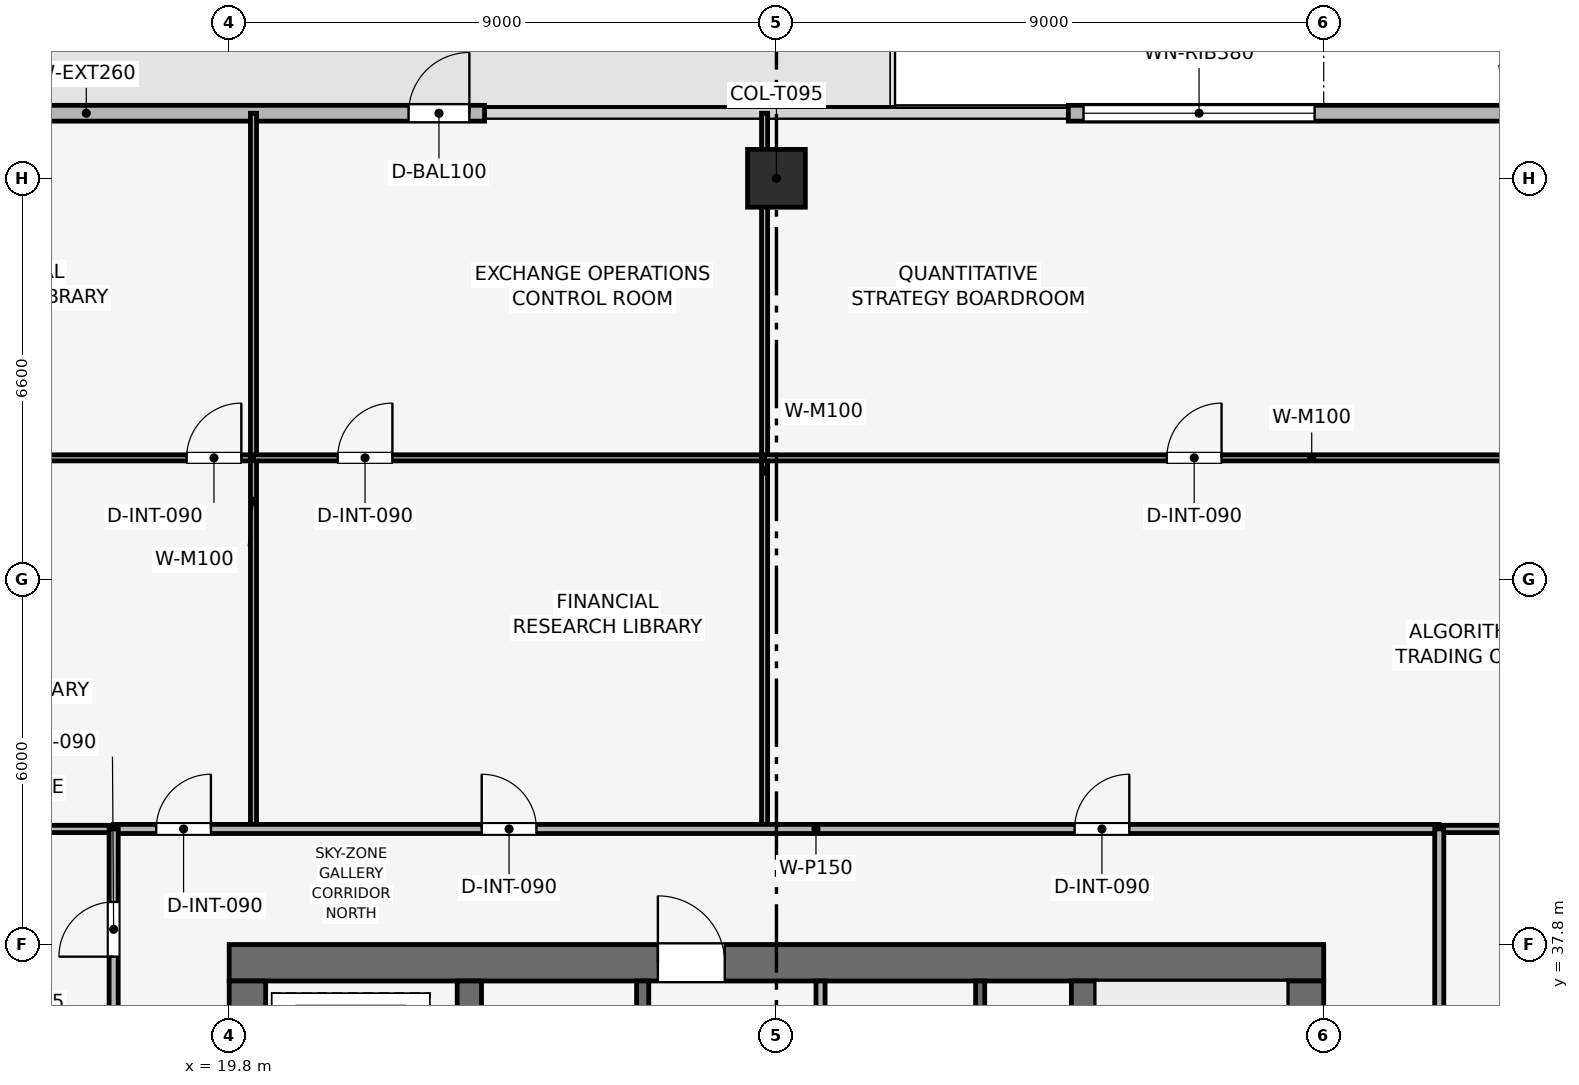
"""IFC4 building model, lengths in metres.
Left out: names, types, materials, properties, quantities, classifications, styles, units other than length and angle.
Written with IfcOpenShell. Run it as: python <this file> out.ifc"""

import sys

from ifc_helpers import new_model, si_unit, direction, frame, frame_2d, origin, origin_2d, place, context, subcontext, project, spatial, rectangle, extrude, element, fill, save


model = new_model("IFC4")
c1 = context("Model", 3, precision=1e-05, world=origin(), true_north=direction((0.0, 1.0)))
c2 = subcontext(c1, "Body", "Model", "MODEL_VIEW")
j1 = project(units=[si_unit("LENGTHUNIT", "METRE"), si_unit("PLANEANGLEUNIT", "RADIAN")], contexts=[c1])
p1 = place(None, origin())
s1 = spatial("IfcSite", under=j1, at=p1, CompositionType="ELEMENT")
p2 = place(p1, origin())
s2 = spatial("IfcBuilding", under=s1, at=p2, CompositionType="ELEMENT")
p3 = place(p2, frame((0.0, 0.0, 299.25)))
s3 = spatial("IfcBuildingStorey", under=s2, at=p3, CompositionType="ELEMENT", Elevation=299.25)
p4 = place(p3, frame((19.8, 37.5, 0.0), z_axis=(0.0, 0.0, 1.0), x_axis=(1.0, 0.0, 0.0)))
e1 = element("IfcWall", 1, at=p4, inside=s3, PredefinedType="SHEAR", context=c2, shape_type="SweptSolid", body=[
    extrude(rectangle(XDim=18.0, YDim=0.6, at=frame_2d((9.0, 0.0))), origin(), (0.0, 0.0, 1.0), 3.75),
])
p5 = place(p4, frame((7.05, 0.0, 0.0)))
e2 = element("IfcOpeningElement", 2, at=p5, cuts=e1, PredefinedType="OPENING", context=c2, shape_type="SweptSolid", body=[
    extrude(rectangle(XDim=1.1, YDim=2.15, at=frame_2d((0.55, 1.075))), frame((0.0, 0.31, 0.0), z_axis=(0.0, -1.0, 0.0), x_axis=(1.0, 0.0, 0.0)), (0.0, 0.0, 1.0), 0.62),
])
p6 = place(p3, frame((20.1, 20.4, 0.0), z_axis=(0.0, 0.0, 1.0), x_axis=(0.0, 1.0, 0.0)))
e3 = element("IfcWall", 3, at=p6, inside=s3, PredefinedType="SHEAR", context=c2, shape_type="SweptSolid", body=[
    extrude(rectangle(XDim=16.8, YDim=0.6, at=frame_2d((8.4, 0.0))), origin(), (0.0, 0.0, 1.0), 3.75),
])
p7 = place(p6, frame((10.4, 0.0, 0.0)))
e4 = element("IfcOpeningElement", 4, at=p7, cuts=e3, PredefinedType="OPENING", context=c2, shape_type="SweptSolid", body=[
    extrude(rectangle(XDim=1.1, YDim=2.15, at=frame_2d((0.55, 1.075))), frame((0.0, 0.31, 0.0), z_axis=(0.0, -1.0, 0.0), x_axis=(1.0, 0.0, 0.0)), (0.0, 0.0, 1.0), 0.62),
])
p8 = place(p3, frame((37.5, 20.4, 0.0), z_axis=(0.0, 0.0, 1.0), x_axis=(0.0, 1.0, 0.0)))
e5 = element("IfcWall", 5, at=p8, inside=s3, PredefinedType="SHEAR", context=c2, shape_type="SweptSolid", body=[
    extrude(rectangle(XDim=16.8, YDim=0.6, at=frame_2d((8.4, 0.0))), origin(), (0.0, 0.0, 1.0), 3.75),
])
p9 = place(p8, frame((4.9, 0.0, 0.0)))
e6 = element("IfcOpeningElement", 6, at=p9, cuts=e5, PredefinedType="OPENING", context=c2, shape_type="SweptSolid", body=[
    extrude(rectangle(XDim=1.1, YDim=2.15, at=frame_2d((0.55, 1.075))), frame((0.0, 0.31, 0.0), z_axis=(0.0, -1.0, 0.0), x_axis=(1.0, 0.0, 0.0)), (0.0, 0.0, 1.0), 0.62),
])
for number, where, z_axis, x_axis in (
    (7, (23.75, 20.4, 0.0), (0.0, 0.0, 1.0), (0.0, 1.0, 0.0)),
    (8, (33.85, 20.4, 0.0), (0.0, 0.0, 1.0), (0.0, 1.0, 0.0)),
):
    element("IfcWall", number, at=place(p3, frame(where, z_axis=z_axis, x_axis=x_axis)), inside=s3, PredefinedType="SHEAR", context=c2, shape_type="SweptSolid", body=[
        extrude(rectangle(XDim=16.8, YDim=0.4, at=frame_2d((8.4, 0.0))), origin(), (0.0, 0.0, 1.0), 3.75),
    ])
p10 = place(p3, frame((28.8, 50.4, 0.003), z_axis=(0.0, 0.0, 1.0), x_axis=(1.0, 0.0, 0.0)))
e9 = element("IfcColumn", 9, at=p10, inside=s3, PredefinedType="COLUMN", context=c2, shape_type="SweptSolid", body=[
    extrude(rectangle(XDim=0.95, YDim=0.95, at=origin_2d()), origin(), (0.0, 0.0, 1.0), 3.504),
])
p11 = place(p3, frame((12.3, 51.47, 0.0), z_axis=(0.0, 0.0, 1.0), x_axis=(1.0, 0.0, 0.0)))
e10 = element("IfcWall", 10, at=p11, inside=s3, PredefinedType="SOLIDWALL", context=c2, shape_type="SweptSolid", body=[
    extrude(rectangle(XDim=11.7, YDim=0.26, at=frame_2d((5.85, 0.0))), origin(), (0.0, 0.0, 1.0), 3.51),
])
p12 = place(p11, frame((10.45, 0.0, 0.0)))
e11 = element("IfcOpeningElement", 11, at=p12, cuts=e10, PredefinedType="OPENING", context=c2, shape_type="SweptSolid", body=[
    extrude(rectangle(XDim=1.0, YDim=2.2, at=frame_2d((0.5, 1.1))), frame((0.0, 0.14, 0.0), z_axis=(0.0, -1.0, 0.0), x_axis=(1.0, 0.0, 0.0)), (0.0, 0.0, 1.0), 0.28),
])
p13 = place(p3, frame((33.6, 51.47, 0.0), z_axis=(0.0, 0.0, 1.0), x_axis=(1.0, 0.0, 0.0)))
e12 = element("IfcWall", 12, at=p13, inside=s3, PredefinedType="SOLIDWALL", context=c2, shape_type="SweptSolid", body=[
    extrude(rectangle(XDim=11.7, YDim=0.26, at=frame_2d((5.85, 0.0))), origin(), (0.0, 0.0, 1.0), 3.51),
])
p14 = place(p13, frame((0.25, 0.0, 0.9)))
e13 = element("IfcOpeningElement", 13, at=p14, cuts=e12, PredefinedType="OPENING", context=c2, shape_type="SweptSolid", body=[
    extrude(rectangle(XDim=3.8, YDim=1.9, at=frame_2d((1.9, 0.95))), frame((0.0, 0.14, 0.0), z_axis=(0.0, -1.0, 0.0), x_axis=(1.0, 0.0, 0.0)), (0.0, 0.0, 1.0), 0.28),
])
p15 = place(p3, frame((32.15, 34.0, 0.0), z_axis=(0.0, 0.0, 1.0), x_axis=(0.0, 1.0, 0.0)))
e14 = element("IfcWall", 14, at=p15, inside=s3, PredefinedType="SHEAR", context=c2, shape_type="SweptSolid", body=[
    extrude(rectangle(XDim=3.2, YDim=0.15, at=frame_2d((1.6, 0.0))), origin(), (0.0, 0.0, 1.0), 3.51),
])
p16 = place(p3, frame((26.6, 34.0, 0.0), z_axis=(0.0, 0.0, 1.0), x_axis=(0.0, 1.0, 0.0)))
e15 = element("IfcWall", 15, at=p16, inside=s3, PredefinedType="SHEAR", context=c2, shape_type="SweptSolid", body=[
    extrude(rectangle(XDim=3.2, YDim=0.2, at=frame_2d((1.6, 0.0))), origin(), (0.0, 0.0, 1.0), 3.51),
])
p17 = place(p16, frame((0.75, 0.0, 0.0)))
e16 = element("IfcOpeningElement", 16, at=p17, cuts=e15, PredefinedType="OPENING", context=c2, shape_type="SweptSolid", body=[
    extrude(rectangle(XDim=1.1, YDim=2.15, at=frame_2d((0.55, 1.075))), frame((0.0, 0.11, 0.0), z_axis=(0.0, -1.0, 0.0), x_axis=(1.0, 0.0, 0.0)), (0.0, 0.0, 1.0), 0.22),
])
p18 = place(p3, frame((29.525, 33.925, 0.0), z_axis=(0.0, 0.0, 1.0), x_axis=(0.0, 1.0, 0.0)))
e17 = element("IfcWall", 17, at=p18, inside=s3, PredefinedType="PARTITIONING", context=c2, shape_type="SweptSolid", body=[
    extrude(rectangle(XDim=3.275, YDim=0.15, at=frame_2d((1.637, 0.0))), origin(), (0.0, 0.0, 1.0), 3.51),
])
p19 = place(p18, frame((0.85, 0.0, 0.0)))
e18 = element("IfcOpeningElement", 18, at=p19, cuts=e17, PredefinedType="OPENING", context=c2, shape_type="SweptSolid", body=[
    extrude(rectangle(XDim=0.9, YDim=2.1, at=frame_2d((0.45, 1.05))), frame((0.0, 0.085, 0.0), z_axis=(0.0, -1.0, 0.0), x_axis=(1.0, 0.0, 0.0)), (0.0, 0.0, 1.0), 0.17),
])
p20 = place(p3, frame((12.3, 45.803, 0.0), z_axis=(0.0, 0.0, 1.0), x_axis=(1.0, 0.0, 0.0)))
e19 = element("IfcWall", 19, at=p20, inside=s3, PredefinedType="MOVABLE", context=c2, shape_type="SweptSolid", body=[
    extrude(rectangle(XDim=7.9, YDim=0.1, at=frame_2d((3.95, 0.0))), origin(), (0.0, 0.0, 1.0), 3.095),
])
p21 = place(p20, frame((6.8, 0.0, 0.0)))
e20 = element("IfcOpeningElement", 20, at=p21, cuts=e19, PredefinedType="OPENING", context=c2, shape_type="SweptSolid", body=[
    extrude(rectangle(XDim=0.9, YDim=2.1, at=frame_2d((0.45, 1.05))), frame((0.0, 0.06, 0.0), z_axis=(0.0, -1.0, 0.0), x_axis=(1.0, 0.0, 0.0)), (0.0, 0.0, 1.0), 0.12),
])
p22 = place(p3, frame((20.2, 39.7, 0.0), z_axis=(0.0, 0.0, 1.0), x_axis=(0.0, 1.0, 0.0)))
e21 = element("IfcWall", 21, at=p22, inside=s3, PredefinedType="MOVABLE", context=c2, shape_type="SweptSolid", body=[
    extrude(rectangle(XDim=11.77, YDim=0.1, at=frame_2d((5.885, 0.0))), origin(), (0.0, 0.0, 1.0), 3.095),
])
p23 = place(p3, frame((20.2, 45.803, 0.0), z_axis=(0.0, 0.0, 1.0), x_axis=(1.0, 0.0, 0.0)))
e22 = element("IfcWall", 22, at=p23, inside=s3, PredefinedType="MOVABLE", context=c2, shape_type="SweptSolid", body=[
    extrude(rectangle(XDim=8.405, YDim=0.1, at=frame_2d((4.203, 0.0))), origin(), (0.0, 0.0, 1.0), 3.095),
])
p24 = place(p23, frame((1.384, 0.0, 0.0)))
e23 = element("IfcOpeningElement", 23, at=p24, cuts=e22, PredefinedType="OPENING", context=c2, shape_type="SweptSolid", body=[
    extrude(rectangle(XDim=0.9, YDim=2.1, at=frame_2d((0.45, 1.05))), frame((0.0, 0.06, 0.0), z_axis=(0.0, -1.0, 0.0), x_axis=(1.0, 0.0, 0.0)), (0.0, 0.0, 1.0), 0.12),
])
p25 = place(p3, frame((28.605, 39.7, 0.0), z_axis=(0.0, 0.0, 1.0), x_axis=(0.0, 1.0, 0.0)))
e24 = element("IfcWall", 24, at=p25, inside=s3, PredefinedType="MOVABLE", context=c2, shape_type="SweptSolid", body=[
    extrude(rectangle(XDim=11.77, YDim=0.1, at=frame_2d((5.885, 0.0))), origin(), (0.0, 0.0, 1.0), 2.995),
])
p26 = place(p3, frame((28.605, 45.803, 0.0), z_axis=(0.0, 0.0, 1.0), x_axis=(1.0, 0.0, 0.0)))
e25 = element("IfcWall", 25, at=p26, inside=s3, PredefinedType="MOVABLE", context=c2, shape_type="SweptSolid", body=[
    extrude(rectangle(XDim=16.695, YDim=0.1, at=frame_2d((8.348, 0.0))), origin(), (0.0, 0.0, 1.0), 3.095),
])
p27 = place(p26, frame((6.615, 0.0, 0.0)))
e26 = element("IfcOpeningElement", 26, at=p27, cuts=e25, PredefinedType="OPENING", context=c2, shape_type="SweptSolid", body=[
    extrude(rectangle(XDim=0.9, YDim=2.1, at=frame_2d((0.45, 1.05))), frame((0.0, 0.06, 0.0), z_axis=(0.0, -1.0, 0.0), x_axis=(1.0, 0.0, 0.0)), (0.0, 0.0, 1.0), 0.12),
])
for number, where, z_axis, x_axis in (
    (27, (6.13, 39.7, 0.0), (0.0, 0.0, 1.0), (1.0, 0.0, 0.0)),
    (28, (39.7, 39.7, 0.0), (0.0, 0.0, 1.0), (1.0, 0.0, 0.0)),
):
    element("IfcWall", number, at=place(p3, frame(where, z_axis=z_axis, x_axis=x_axis)), inside=s3, PredefinedType="PARTITIONING", context=c2, shape_type="SweptSolid", body=[
        extrude(rectangle(XDim=11.77, YDim=0.12, at=frame_2d((5.885, 0.0))), origin(), (0.0, 0.0, 1.0), 3.095),
    ])
p28 = place(p3, frame((17.9, 39.7, 0.0), z_axis=(0.0, 0.0, 1.0), x_axis=(1.0, 0.0, 0.0)))
e29 = element("IfcWall", 29, at=p28, inside=s3, PredefinedType="PARTITIONING", context=c2, shape_type="SweptSolid", body=[
    extrude(rectangle(XDim=21.8, YDim=0.15, at=frame_2d((10.9, 0.0))), origin(), (0.0, 0.0, 1.0), 3.095),
])
p29 = place(p28, frame((0.7, 0.0, 0.0)))
e30 = element("IfcOpeningElement", 30, at=p29, cuts=e29, PredefinedType="OPENING", context=c2, shape_type="SweptSolid", body=[
    extrude(rectangle(XDim=0.9, YDim=2.1, at=frame_2d((0.45, 1.05))), frame((0.0, 0.085, 0.0), z_axis=(0.0, -1.0, 0.0), x_axis=(1.0, 0.0, 0.0)), (0.0, 0.0, 1.0), 0.17),
])
p30 = place(p28, frame((6.053, 0.0, 0.0)))
e31 = element("IfcOpeningElement", 31, at=p30, cuts=e29, PredefinedType="OPENING", context=c2, shape_type="SweptSolid", body=[
    extrude(rectangle(XDim=0.9, YDim=2.1, at=frame_2d((0.45, 1.05))), frame((0.0, 0.085, 0.0), z_axis=(0.0, -1.0, 0.0), x_axis=(1.0, 0.0, 0.0)), (0.0, 0.0, 1.0), 0.17),
])
p31 = place(p28, frame((15.803, 0.0, 0.0)))
e32 = element("IfcOpeningElement", 32, at=p31, cuts=e29, PredefinedType="OPENING", context=c2, shape_type="SweptSolid", body=[
    extrude(rectangle(XDim=0.9, YDim=2.1, at=frame_2d((0.45, 1.05))), frame((0.0, 0.085, 0.0), z_axis=(0.0, -1.0, 0.0), x_axis=(1.0, 0.0, 0.0)), (0.0, 0.0, 1.0), 0.17),
])
p32 = place(p3, frame((17.9, 12.3, 0.0), z_axis=(0.0, 0.0, 1.0), x_axis=(0.0, 1.0, 0.0)))
e33 = element("IfcWall", 33, at=p32, inside=s3, PredefinedType="PARTITIONING", context=c2, shape_type="SweptSolid", body=[
    extrude(rectangle(XDim=27.4, YDim=0.15, at=frame_2d((13.7, 0.0))), origin(), (0.0, 0.0, 1.0), 3.095),
])
p33 = place(p32, frame((2.365, 0.0, 0.0)))
e34 = element("IfcOpeningElement", 34, at=p33, cuts=e33, PredefinedType="OPENING", context=c2, shape_type="SweptSolid", body=[
    extrude(rectangle(XDim=0.9, YDim=2.1, at=frame_2d((0.45, 1.05))), frame((0.0, 0.085, 0.0), z_axis=(0.0, -1.0, 0.0), x_axis=(1.0, 0.0, 0.0)), (0.0, 0.0, 1.0), 0.17),
])
p34 = place(p32, frame((10.215, 0.0, 0.0)))
e35 = element("IfcOpeningElement", 35, at=p34, cuts=e33, PredefinedType="OPENING", context=c2, shape_type="SweptSolid", body=[
    extrude(rectangle(XDim=0.9, YDim=2.1, at=frame_2d((0.45, 1.05))), frame((0.0, 0.085, 0.0), z_axis=(0.0, -1.0, 0.0), x_axis=(1.0, 0.0, 0.0)), (0.0, 0.0, 1.0), 0.17),
])
p35 = place(p32, frame((16.65, 0.0, 0.0)))
e36 = element("IfcOpeningElement", 36, at=p35, cuts=e33, PredefinedType="OPENING", context=c2, shape_type="SweptSolid", body=[
    extrude(rectangle(XDim=0.9, YDim=2.1, at=frame_2d((0.45, 1.05))), frame((0.0, 0.085, 0.0), z_axis=(0.0, -1.0, 0.0), x_axis=(1.0, 0.0, 0.0)), (0.0, 0.0, 1.0), 0.17),
])
p36 = place(p32, frame((19.55, 0.0, 0.0)))
e37 = element("IfcOpeningElement", 37, at=p36, cuts=e33, PredefinedType="OPENING", context=c2, shape_type="SweptSolid", body=[
    extrude(rectangle(XDim=0.9, YDim=2.1, at=frame_2d((0.45, 1.05))), frame((0.0, 0.085, 0.0), z_axis=(0.0, -1.0, 0.0), x_axis=(1.0, 0.0, 0.0)), (0.0, 0.0, 1.0), 0.17),
])
p37 = place(p32, frame((22.3, 0.0, 0.0)))
e38 = element("IfcOpeningElement", 38, at=p37, cuts=e33, PredefinedType="OPENING", context=c2, shape_type="SweptSolid", body=[
    extrude(rectangle(XDim=0.95, YDim=2.1, at=frame_2d((0.475, 1.05))), frame((0.0, 0.085, 0.0), z_axis=(0.0, -1.0, 0.0), x_axis=(1.0, 0.0, 0.0)), (0.0, 0.0, 1.0), 0.17),
])
p38 = place(p32, frame((25.3, 0.0, 0.0)))
e39 = element("IfcOpeningElement", 39, at=p38, cuts=e33, PredefinedType="OPENING", context=c2, shape_type="SweptSolid", body=[
    extrude(rectangle(XDim=0.9, YDim=2.1, at=frame_2d((0.45, 1.05))), frame((0.0, 0.085, 0.0), z_axis=(0.0, -1.0, 0.0), x_axis=(1.0, 0.0, 0.0)), (0.0, 0.0, 1.0), 0.17),
])
p39 = place(p3, frame((39.7, 24.4, 0.0), z_axis=(0.0, 0.0, 1.0), x_axis=(0.0, 1.0, 0.0)))
e40 = element("IfcWall", 40, at=p39, inside=s3, PredefinedType="PARTITIONING", context=c2, shape_type="SweptSolid", body=[
    extrude(rectangle(XDim=15.3, YDim=0.15, at=frame_2d((7.65, 0.0))), origin(), (0.0, 0.0, 1.0), 3.095),
])
p40 = place(p39, frame((7.2, 0.0, 0.0)))
e41 = element("IfcOpeningElement", 41, at=p40, cuts=e40, PredefinedType="OPENING", context=c2, shape_type="SweptSolid", body=[
    extrude(rectangle(XDim=0.9, YDim=2.1, at=frame_2d((0.45, 1.05))), frame((0.0, 0.085, 0.0), z_axis=(0.0, -1.0, 0.0), x_axis=(1.0, 0.0, 0.0)), (0.0, 0.0, 1.0), 0.17),
])
p41 = place(p12, origin())
e42 = element("IfcDoor", 42, at=p41, inside=s3, OperationType="SINGLE_SWING_RIGHT", PredefinedType="DOOR", context=c2, shape_type="SweptSolid", body=[
    extrude(rectangle(XDim=1.0, YDim=2.2, at=frame_2d((0.5, 1.1))), frame((0.0, 0.025, 0.0), z_axis=(0.0, -1.0, 0.0), x_axis=(1.0, 0.0, 0.0)), (0.0, 0.0, 1.0), 0.05),
])
fill(e11, e42)
p42 = place(p14, origin())
e43 = element("IfcWindow", 43, at=p42, inside=s3, PartitioningType="SINGLE_PANEL", PredefinedType="WINDOW", context=c2, shape_type="SweptSolid", body=[
    extrude(rectangle(XDim=3.8, YDim=1.9, at=frame_2d((1.9, 0.95))), frame((0.0, 0.03, 0.0), z_axis=(0.0, -1.0, 0.0), x_axis=(1.0, 0.0, 0.0)), (0.0, 0.0, 1.0), 0.06),
])
fill(e13, e43)
p43 = place(p21, origin())
e44 = element("IfcDoor", 44, at=p43, inside=s3, OperationType="SINGLE_SWING_RIGHT", PredefinedType="DOOR", context=c2, shape_type="SweptSolid", body=[
    extrude(rectangle(XDim=0.9, YDim=2.1, at=frame_2d((0.45, 1.05))), frame((0.0, 0.025, 0.0), z_axis=(0.0, -1.0, 0.0), x_axis=(1.0, 0.0, 0.0)), (0.0, 0.0, 1.0), 0.05),
])
fill(e20, e44)
p44 = place(p24, origin())
e45 = element("IfcDoor", 45, at=p44, inside=s3, OperationType="SINGLE_SWING_RIGHT", PredefinedType="DOOR", context=c2, shape_type="SweptSolid", body=[
    extrude(rectangle(XDim=0.9, YDim=2.1, at=frame_2d((0.45, 1.05))), frame((0.0, 0.025, 0.0), z_axis=(0.0, -1.0, 0.0), x_axis=(1.0, 0.0, 0.0)), (0.0, 0.0, 1.0), 0.05),
])
fill(e23, e45)
p45 = place(p27, origin())
e46 = element("IfcDoor", 46, at=p45, inside=s3, OperationType="SINGLE_SWING_RIGHT", PredefinedType="DOOR", context=c2, shape_type="SweptSolid", body=[
    extrude(rectangle(XDim=0.9, YDim=2.1, at=frame_2d((0.45, 1.05))), frame((0.0, 0.025, 0.0), z_axis=(0.0, -1.0, 0.0), x_axis=(1.0, 0.0, 0.0)), (0.0, 0.0, 1.0), 0.05),
])
fill(e26, e46)
p46 = place(p29, origin())
e47 = element("IfcDoor", 47, at=p46, inside=s3, OperationType="SINGLE_SWING_RIGHT", PredefinedType="DOOR", context=c2, shape_type="SweptSolid", body=[
    extrude(rectangle(XDim=0.9, YDim=2.1, at=frame_2d((0.45, 1.05))), frame((0.0, 0.025, 0.0), z_axis=(0.0, -1.0, 0.0), x_axis=(1.0, 0.0, 0.0)), (0.0, 0.0, 1.0), 0.05),
])
fill(e30, e47)
p47 = place(p30, origin())
e48 = element("IfcDoor", 48, at=p47, inside=s3, OperationType="SINGLE_SWING_LEFT", PredefinedType="DOOR", context=c2, shape_type="SweptSolid", body=[
    extrude(rectangle(XDim=0.9, YDim=2.1, at=frame_2d((0.45, 1.05))), frame((0.0, 0.025, 0.0), z_axis=(0.0, -1.0, 0.0), x_axis=(1.0, 0.0, 0.0)), (0.0, 0.0, 1.0), 0.05),
])
fill(e31, e48)
p48 = place(p31, origin())
e49 = element("IfcDoor", 49, at=p48, inside=s3, OperationType="SINGLE_SWING_RIGHT", PredefinedType="DOOR", context=c2, shape_type="SweptSolid", body=[
    extrude(rectangle(XDim=0.9, YDim=2.1, at=frame_2d((0.45, 1.05))), frame((0.0, 0.025, 0.0), z_axis=(0.0, -1.0, 0.0), x_axis=(1.0, 0.0, 0.0)), (0.0, 0.0, 1.0), 0.05),
])
fill(e32, e49)
p49 = place(p38, origin())
e50 = element("IfcDoor", 50, at=p49, inside=s3, OperationType="SINGLE_SWING_LEFT", PredefinedType="DOOR", context=c2, shape_type="SweptSolid", body=[
    extrude(rectangle(XDim=0.9, YDim=2.1, at=frame_2d((0.45, 1.05))), frame((0.0, 0.025, 0.0), z_axis=(0.0, -1.0, 0.0), x_axis=(1.0, 0.0, 0.0)), (0.0, 0.0, 1.0), 0.05),
])
fill(e39, e50)
p50 = place(p5, origin())
e51 = element("IfcDoor", 51, at=p50, inside=s3, OperationType="SINGLE_SWING_LEFT", PredefinedType="DOOR", context=c2, shape_type="SweptSolid", body=[
    extrude(rectangle(XDim=1.1, YDim=2.15, at=frame_2d((0.55, 1.075))), frame((0.0, 0.025, 0.0), z_axis=(0.0, -1.0, 0.0), x_axis=(1.0, 0.0, 0.0)), (0.0, 0.0, 1.0), 0.05),
])
fill(e2, e51)
save(model, sys.argv[1])
